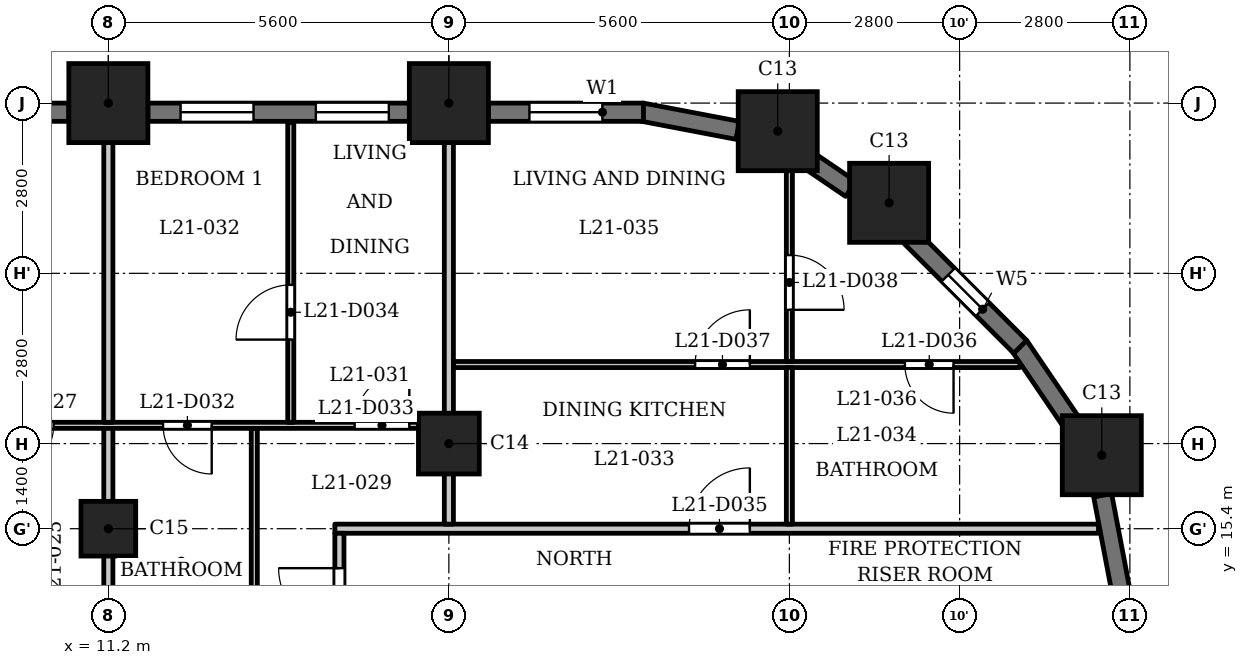
"""IFC4 building model, lengths in metres.
Left out: names, types, materials, properties, quantities, classifications, styles, units other than length and angle.
Written with IfcOpenShell. Run it as: python <this file> out.ifc"""

import sys

from ifc_helpers import new_model, si_unit, direction, frame, frame_2d, origin, origin_2d, place, context, subcontext, project, spatial, rectangle, extrude, element, fill, save


model = new_model("IFC4")
c1 = context("Model", 3, precision=1e-05, world=origin(), true_north=direction((0.0, 1.0)))
c2 = subcontext(c1, "Body", "Model", "MODEL_VIEW")
j1 = project(units=[si_unit("LENGTHUNIT", "METRE"), si_unit("PLANEANGLEUNIT", "RADIAN")], contexts=[c1])
p1 = place(None, origin())
s1 = spatial("IfcSite", under=j1, at=p1, CompositionType="ELEMENT")
p2 = place(p1, origin())
s2 = spatial("IfcBuilding", under=s1, at=p2, CompositionType="ELEMENT")
p3 = place(p2, frame((0.0, 0.0, 86.8)))
s3 = spatial("IfcBuildingStorey", under=s2, at=p3, CompositionType="ELEMENT", Elevation=86.8)
for number, where, z_axis, x_axis in (
    (1, (27.538, 16.609, 0.0), (0.0, 0.0, 1.0), (1.0, 0.0, 0.0)),
    (2, (24.04, 20.76, 0.0), (0.0, 0.0, 1.0), (1.0, 0.0, 0.0)),
    (3, (22.209, 21.938, 0.0), (0.0, 0.0, 1.0), (1.0, 0.0, 0.0)),
    (4, (16.8, 22.4, 0.0), (0.0, 0.0, 1.0), (1.0, 0.0, 0.0)),
    (5, (11.2, 22.4, 0.0), (0.0, 0.0, 1.0), (1.0, 0.0, 0.0)),
):
    element("IfcColumn", number, at=place(p3, frame(where, z_axis=z_axis, x_axis=x_axis)), inside=s3, PredefinedType="COLUMN", context=c2, shape_type="SweptSolid", body=[
        extrude(rectangle(XDim=1.3, YDim=1.3, at=origin_2d()), origin(), (0.0, 0.0, 1.0), 3.5),
    ])
p4 = place(p3, frame((16.8, 16.8, 0.0), z_axis=(0.0, 0.0, 1.0), x_axis=(1.0, 0.0, 0.0)))
e6 = element("IfcColumn", 6, at=p4, inside=s3, PredefinedType="COLUMN", context=c2, shape_type="SweptSolid", body=[
    extrude(rectangle(XDim=1.0, YDim=1.0, at=origin_2d()), origin(), (0.0, 0.0, 1.0), 3.5),
])
p5 = place(p3, frame((11.2, 15.4, 0.0), z_axis=(0.0, 0.0, 1.0), x_axis=(1.0, 0.0, 0.0)))
e7 = element("IfcColumn", 7, at=p5, inside=s3, PredefinedType="COLUMN", context=c2, shape_type="SweptSolid", body=[
    extrude(rectangle(XDim=0.9, YDim=0.9, at=origin_2d()), origin(), (0.0, 0.0, 1.0), 3.5),
])
for number, where, z_axis, x_axis in (
    (8, (27.853, 14.372, 0.0), (0.0, 0.0, 1.0), (-0.187, 0.982, 0.0)),
    (9, (27.082, 17.084, 0.0), (0.0, 0.0, 1.0), (-0.562, 0.827, 0.0)),
):
    element("IfcWall", number, at=place(p3, frame(where, z_axis=z_axis, x_axis=x_axis)), inside=s3, PredefinedType="SOLIDWALL", context=c2, shape_type="SweptSolid", body=[
        extrude(rectangle(XDim=1.606, YDim=0.3, at=frame_2d((0.803, 0.0))), origin(), (0.0, 0.0, 1.0), 2.4),
    ])
p6 = place(p3, frame((26.197, 18.391, 0.0), z_axis=(0.0, 0.0, 1.0), x_axis=(-0.707058908279, 0.707154650853, 0.0)))
e10 = element("IfcWall", 10, at=p6, inside=s3, PredefinedType="SOLIDWALL", context=c2, shape_type="SweptSolid", body=[
    extrude(rectangle(XDim=2.55, YDim=0.3, at=frame_2d((1.275, 0.0))), origin(), (0.0, 0.0, 1.0), 2.4),
])
p7 = place(p6, frame((0.875, 0.0, 0.6)))
e11 = element("IfcOpeningElement", 11, at=p7, cuts=e10, PredefinedType="OPENING", context=c2, shape_type="SweptSolid", body=[
    extrude(rectangle(XDim=0.8, YDim=1.55, at=frame_2d((0.4, 0.775))), frame((0.0, 0.16, 0.0), z_axis=(0.0, -1.0, 0.0), x_axis=(1.0, 0.0, 0.0)), (0.0, 0.0, 1.0), 0.32),
])
p8 = place(p3, frame((23.41, 20.989, 0.0), z_axis=(0.0, 0.0, 1.0), x_axis=(-0.827050703543, 0.562127328787, 0.0)))
e12 = element("IfcWall", 12, at=p8, inside=s3, PredefinedType="SOLIDWALL", context=c2, shape_type="SweptSolid", body=[
    extrude(rectangle(XDim=0.877, YDim=0.3, at=frame_2d((0.438, 0.0))), origin(), (0.0, 0.0, 1.0), 3.2),
])
p9 = place(p3, frame((21.55, 21.952, 0.0), z_axis=(0.0, 0.0, 1.0), x_axis=(-0.982278644094, 0.187426426519, 0.0)))
e13 = element("IfcWall", 13, at=p9, inside=s3, PredefinedType="SOLIDWALL", context=c2, shape_type="SweptSolid", body=[
    extrude(rectangle(XDim=1.606, YDim=0.3, at=frame_2d((0.803, 0.0))), origin(), (0.0, 0.0, 1.0), 2.4),
])
p10 = place(p3, frame((20.0, 22.25, 0.0), z_axis=(0.0, 0.0, 1.0), x_axis=(-1.0, 0.0, 0.0)))
e14 = element("IfcWall", 14, at=p10, inside=s3, PredefinedType="SOLIDWALL", context=c2, shape_type="SweptSolid", body=[
    extrude(rectangle(XDim=2.55, YDim=0.3, at=frame_2d((1.275, 0.0))), origin(), (0.0, 0.0, 1.0), 2.4),
])
p11 = place(p10, frame((0.675, 0.0, 0.6)))
e15 = element("IfcOpeningElement", 15, at=p11, cuts=e14, PredefinedType="OPENING", context=c2, shape_type="SweptSolid", body=[
    extrude(rectangle(XDim=1.2, YDim=1.55, at=frame_2d((0.6, 0.775))), frame((0.0, 0.16, 0.0), z_axis=(0.0, -1.0, 0.0), x_axis=(1.0, 0.0, 0.0)), (0.0, 0.0, 1.0), 0.32),
])
p12 = place(p3, frame((16.15, 22.25, 0.0), z_axis=(0.0, 0.0, 1.0), x_axis=(-1.0, 0.0, 0.0)))
e16 = element("IfcWall", 16, at=p12, inside=s3, PredefinedType="SOLIDWALL", context=c2, shape_type="SweptSolid", body=[
    extrude(rectangle(XDim=4.3, YDim=0.3, at=frame_2d((2.15, 0.0))), origin(), (0.0, 0.0, 1.0), 2.4),
])
p13 = place(p12, frame((0.337, 0.0, 0.6)))
e17 = element("IfcOpeningElement", 17, at=p13, cuts=e16, PredefinedType="OPENING", context=c2, shape_type="SweptSolid", body=[
    extrude(rectangle(XDim=1.2, YDim=1.55, at=frame_2d((0.6, 0.775))), frame((0.0, 0.16, 0.0), z_axis=(0.0, -1.0, 0.0), x_axis=(1.0, 0.0, 0.0)), (0.0, 0.0, 1.0), 0.32),
])
p14 = place(p12, frame((2.562, 0.0, 0.6)))
e18 = element("IfcOpeningElement", 18, at=p14, cuts=e16, PredefinedType="OPENING", context=c2, shape_type="SweptSolid", body=[
    extrude(rectangle(XDim=1.2, YDim=1.55, at=frame_2d((0.6, 0.775))), frame((0.0, 0.16, 0.0), z_axis=(0.0, -1.0, 0.0), x_axis=(1.0, 0.0, 0.0)), (0.0, 0.0, 1.0), 0.32),
])
p15 = place(p3, frame((10.55, 22.25, 0.0), z_axis=(0.0, 0.0, 1.0), x_axis=(-1.0, 0.0, 0.0)))
e19 = element("IfcWall", 19, at=p15, inside=s3, PredefinedType="SOLIDWALL", context=c2, shape_type="SweptSolid", body=[
    extrude(rectangle(XDim=4.3, YDim=0.3, at=frame_2d((2.15, 0.0))), origin(), (0.0, 0.0, 1.0), 2.4),
])
p16 = place(p15, frame((0.35, 0.0, 1.2)))
e20 = element("IfcOpeningElement", 20, at=p16, cuts=e19, PredefinedType="OPENING", context=c2, shape_type="SweptSolid", body=[
    extrude(rectangle(XDim=3.6, YDim=0.95, at=frame_2d((1.8, 0.475))), frame((0.0, 0.16, 0.0), z_axis=(0.0, -1.0, 0.0), x_axis=(1.0, 0.0, 0.0)), (0.0, 0.0, 1.0), 0.32),
])
p17 = place(p3, frame((14.925, 15.4, 0.0), z_axis=(0.0, 0.0, 1.0), x_axis=(1.0, 0.0, 0.0)))
e21 = element("IfcWall", 21, at=p17, inside=s3, PredefinedType="PARTITIONING", context=c2, shape_type="SweptSolid", body=[
    extrude(rectangle(XDim=12.559, YDim=0.15, at=frame_2d((6.279, 0.0))), origin(), (0.0, 0.0, 1.0), 3.2),
])
p18 = place(p17, frame((5.825, 0.0, 0.0)))
e22 = element("IfcOpeningElement", 22, at=p18, cuts=e21, PredefinedType="OPENING", context=c2, shape_type="SweptSolid", body=[
    extrude(rectangle(XDim=1.0, YDim=2.1, at=frame_2d((0.5, 1.05))), frame((0.0, 0.085, 0.0), z_axis=(0.0, -1.0, 0.0), x_axis=(1.0, 0.0, 0.0)), (0.0, 0.0, 1.0), 0.17),
])
p19 = place(p3, frame((-16.725, 17.1, 0.0), z_axis=(0.0, 0.0, 1.0), x_axis=(1.0, 0.0, 0.0)))
e23 = element("IfcWall", 23, at=p19, inside=s3, PredefinedType="PARTITIONING", context=c2, shape_type="SweptSolid", body=[
    extrude(rectangle(XDim=33.45, YDim=0.1, at=frame_2d((16.725, 0.0))), origin(), (0.0, 0.0, 1.0), 3.2),
])
p20 = place(p19, frame((3.925, 0.0, 0.0)))
e24 = element("IfcOpeningElement", 24, at=p20, cuts=e23, PredefinedType="OPENING", context=c2, shape_type="SweptSolid", body=[
    extrude(rectangle(XDim=0.8, YDim=2.1, at=frame_2d((0.4, 1.05))), frame((0.0, 0.06, 0.0), z_axis=(0.0, -1.0, 0.0), x_axis=(1.0, 0.0, 0.0)), (0.0, 0.0, 1.0), 0.12),
])
p21 = place(p19, frame((0.975, 0.0, 0.0)))
e25 = element("IfcOpeningElement", 25, at=p21, cuts=e23, PredefinedType="OPENING", context=c2, shape_type="SweptSolid", body=[
    extrude(rectangle(XDim=0.9, YDim=2.1, at=frame_2d((0.45, 1.05))), frame((0.0, 0.06, 0.0), z_axis=(0.0, -1.0, 0.0), x_axis=(1.0, 0.0, 0.0)), (0.0, 0.0, 1.0), 0.12),
])
p22 = place(p19, frame((6.425, 0.0, 0.0)))
e26 = element("IfcOpeningElement", 26, at=p22, cuts=e23, PredefinedType="OPENING", context=c2, shape_type="SweptSolid", body=[
    extrude(rectangle(XDim=0.8, YDim=2.1, at=frame_2d((0.4, 1.05))), frame((0.0, 0.06, 0.0), z_axis=(0.0, -1.0, 0.0), x_axis=(1.0, 0.0, 0.0)), (0.0, 0.0, 1.0), 0.12),
])
p23 = place(p19, frame((8.825, 0.0, 0.0)))
e27 = element("IfcOpeningElement", 27, at=p23, cuts=e23, PredefinedType="OPENING", context=c2, shape_type="SweptSolid", body=[
    extrude(rectangle(XDim=0.9, YDim=2.1, at=frame_2d((0.45, 1.05))), frame((0.0, 0.06, 0.0), z_axis=(0.0, -1.0, 0.0), x_axis=(1.0, 0.0, 0.0)), (0.0, 0.0, 1.0), 0.12),
])
p24 = place(p19, frame((12.375, 0.0, 0.0)))
e28 = element("IfcOpeningElement", 28, at=p24, cuts=e23, PredefinedType="OPENING", context=c2, shape_type="SweptSolid", body=[
    extrude(rectangle(XDim=0.9, YDim=2.1, at=frame_2d((0.45, 1.05))), frame((0.0, 0.06, 0.0), z_axis=(0.0, -1.0, 0.0), x_axis=(1.0, 0.0, 0.0)), (0.0, 0.0, 1.0), 0.12),
])
p25 = place(p19, frame((14.425, 0.0, 0.0)))
e29 = element("IfcOpeningElement", 29, at=p25, cuts=e23, PredefinedType="OPENING", context=c2, shape_type="SweptSolid", body=[
    extrude(rectangle(XDim=0.9, YDim=2.1, at=frame_2d((0.45, 1.05))), frame((0.0, 0.06, 0.0), z_axis=(0.0, -1.0, 0.0), x_axis=(1.0, 0.0, 0.0)), (0.0, 0.0, 1.0), 0.12),
])
p26 = place(p19, frame((26.225, 0.0, 0.0)))
e30 = element("IfcOpeningElement", 30, at=p26, cuts=e23, PredefinedType="OPENING", context=c2, shape_type="SweptSolid", body=[
    extrude(rectangle(XDim=0.8, YDim=2.1, at=frame_2d((0.4, 1.05))), frame((0.0, 0.06, 0.0), z_axis=(0.0, -1.0, 0.0), x_axis=(1.0, 0.0, 0.0)), (0.0, 0.0, 1.0), 0.12),
])
p27 = place(p19, frame((23.025, 0.0, 0.0)))
e31 = element("IfcOpeningElement", 31, at=p27, cuts=e23, PredefinedType="OPENING", context=c2, shape_type="SweptSolid", body=[
    extrude(rectangle(XDim=0.9, YDim=2.1, at=frame_2d((0.45, 1.05))), frame((0.0, 0.06, 0.0), z_axis=(0.0, -1.0, 0.0), x_axis=(1.0, 0.0, 0.0)), (0.0, 0.0, 1.0), 0.12),
])
p28 = place(p19, frame((17.775, 0.0, 0.0)))
e32 = element("IfcOpeningElement", 32, at=p28, cuts=e23, PredefinedType="OPENING", context=c2, shape_type="SweptSolid", body=[
    extrude(rectangle(XDim=0.9, YDim=2.1, at=frame_2d((0.45, 1.05))), frame((0.0, 0.06, 0.0), z_axis=(0.0, -1.0, 0.0), x_axis=(1.0, 0.0, 0.0)), (0.0, 0.0, 1.0), 0.12),
])
p29 = place(p19, frame((20.025, 0.0, 0.0)))
e33 = element("IfcOpeningElement", 33, at=p29, cuts=e23, PredefinedType="OPENING", context=c2, shape_type="SweptSolid", body=[
    extrude(rectangle(XDim=0.9, YDim=2.1, at=frame_2d((0.45, 1.05))), frame((0.0, 0.06, 0.0), z_axis=(0.0, -1.0, 0.0), x_axis=(1.0, 0.0, 0.0)), (0.0, 0.0, 1.0), 0.12),
])
p30 = place(p19, frame((28.825, 0.0, 0.0)))
e34 = element("IfcOpeningElement", 34, at=p30, cuts=e23, PredefinedType="OPENING", context=c2, shape_type="SweptSolid", body=[
    extrude(rectangle(XDim=0.8, YDim=2.1, at=frame_2d((0.4, 1.05))), frame((0.0, 0.06, 0.0), z_axis=(0.0, -1.0, 0.0), x_axis=(1.0, 0.0, 0.0)), (0.0, 0.0, 1.0), 0.12),
])
p31 = place(p19, frame((31.975, 0.0, 0.0)))
e35 = element("IfcOpeningElement", 35, at=p31, cuts=e23, PredefinedType="OPENING", context=c2, shape_type="SweptSolid", body=[
    extrude(rectangle(XDim=0.9, YDim=2.1, at=frame_2d((0.45, 1.05))), frame((0.0, 0.06, 0.0), z_axis=(0.0, -1.0, 0.0), x_axis=(1.0, 0.0, 0.0)), (0.0, 0.0, 1.0), 0.12),
])
p32 = place(p3, frame((16.875, 18.1, 0.0), z_axis=(0.0, 0.0, 1.0), x_axis=(1.0, 0.0, 0.0)))
e36 = element("IfcWall", 36, at=p32, inside=s3, PredefinedType="PARTITIONING", context=c2, shape_type="SweptSolid", body=[
    extrude(rectangle(XDim=9.315, YDim=0.1, at=frame_2d((4.658, 0.0))), origin(), (0.0, 0.0, 1.0), 3.2),
])
p33 = place(p32, frame((7.425, 0.0, 0.0)))
e37 = element("IfcOpeningElement", 37, at=p33, cuts=e36, PredefinedType="OPENING", context=c2, shape_type="SweptSolid", body=[
    extrude(rectangle(XDim=0.8, YDim=2.1, at=frame_2d((0.4, 1.05))), frame((0.0, 0.06, 0.0), z_axis=(0.0, -1.0, 0.0), x_axis=(1.0, 0.0, 0.0)), (0.0, 0.0, 1.0), 0.12),
])
p34 = place(p32, frame((3.975, 0.0, 0.0)))
e38 = element("IfcOpeningElement", 38, at=p34, cuts=e36, PredefinedType="OPENING", context=c2, shape_type="SweptSolid", body=[
    extrude(rectangle(XDim=0.9, YDim=2.1, at=frame_2d((0.45, 1.05))), frame((0.0, 0.06, 0.0), z_axis=(0.0, -1.0, 0.0), x_axis=(1.0, 0.0, 0.0)), (0.0, 0.0, 1.0), 0.12),
])
p35 = place(p3, frame((11.2, 13.275, 0.0), z_axis=(0.0, 0.0, 1.0), x_axis=(0.0, 1.0, 0.0)))
e39 = element("IfcWall", 39, at=p35, inside=s3, PredefinedType="PARTITIONING", context=c2, shape_type="SweptSolid", body=[
    extrude(rectangle(XDim=3.775, YDim=0.15, at=frame_2d((1.888, 0.0))), origin(), (0.0, 0.0, 1.0), 3.2),
])
p36 = place(p3, frame((11.2, 17.15, 0.0), z_axis=(0.0, 0.0, 1.0), x_axis=(0.0, 1.0, 0.0)))
e40 = element("IfcWall", 40, at=p36, inside=s3, PredefinedType="PARTITIONING", context=c2, shape_type="SweptSolid", body=[
    extrude(rectangle(XDim=5.88, YDim=0.15, at=frame_2d((2.94, 0.0))), origin(), (0.0, 0.0, 1.0), 3.2),
])
p37 = place(p3, frame((13.6, 13.275, 0.0), z_axis=(0.0, 0.0, 1.0), x_axis=(0.0, 1.0, 0.0)))
e41 = element("IfcWall", 41, at=p37, inside=s3, PredefinedType="PARTITIONING", context=c2, shape_type="SweptSolid", body=[
    extrude(rectangle(XDim=3.775, YDim=0.1, at=frame_2d((1.888, 0.0))), origin(), (0.0, 0.0, 1.0), 3.2),
])
p38 = place(p3, frame((14.2, 17.15, 0.0), z_axis=(0.0, 0.0, 1.0), x_axis=(0.0, 1.0, 0.0)))
e42 = element("IfcWall", 42, at=p38, inside=s3, PredefinedType="PARTITIONING", context=c2, shape_type="SweptSolid", body=[
    extrude(rectangle(XDim=4.93, YDim=0.1, at=frame_2d((2.465, 0.0))), origin(), (0.0, 0.0, 1.0), 3.2),
])
p39 = place(p38, frame((1.36, 0.0, 0.0)))
e43 = element("IfcOpeningElement", 43, at=p39, cuts=e42, PredefinedType="OPENING", context=c2, shape_type="SweptSolid", body=[
    extrude(rectangle(XDim=0.9, YDim=2.1, at=frame_2d((0.45, 1.05))), frame((0.0, 0.06, 0.0), z_axis=(0.0, -1.0, 0.0), x_axis=(1.0, 0.0, 0.0)), (0.0, 0.0, 1.0), 0.12),
])
p40 = place(p3, frame((15.0, 13.275, 0.0), z_axis=(0.0, 0.0, 1.0), x_axis=(0.0, 1.0, 0.0)))
e44 = element("IfcWall", 44, at=p40, inside=s3, PredefinedType="PARTITIONING", context=c2, shape_type="SweptSolid", body=[
    extrude(rectangle(XDim=2.05, YDim=0.15, at=frame_2d((1.025, 0.0))), origin(), (0.0, 0.0, 1.0), 3.2),
])
p41 = place(p40, frame((0.476, 0.0, 0.0)))
e45 = element("IfcOpeningElement", 45, at=p41, cuts=e44, PredefinedType="OPENING", context=c2, shape_type="SweptSolid", body=[
    extrude(rectangle(XDim=1.0, YDim=2.1, at=frame_2d((0.5, 1.05))), frame((0.0, 0.085, 0.0), z_axis=(0.0, -1.0, 0.0), x_axis=(1.0, 0.0, 0.0)), (0.0, 0.0, 1.0), 0.17),
])
p42 = place(p3, frame((16.8, 15.475, 0.0), z_axis=(0.0, 0.0, 1.0), x_axis=(0.0, 1.0, 0.0)))
e46 = element("IfcWall", 46, at=p42, inside=s3, PredefinedType="PARTITIONING", context=c2, shape_type="SweptSolid", body=[
    extrude(rectangle(XDim=7.555, YDim=0.15, at=frame_2d((3.777, 0.0))), origin(), (0.0, 0.0, 1.0), 3.2),
])
p43 = place(p3, frame((22.4, 15.475, 0.0), z_axis=(0.0, 0.0, 1.0), x_axis=(0.0, 1.0, 0.0)))
e47 = element("IfcWall", 47, at=p43, inside=s3, PredefinedType="PARTITIONING", context=c2, shape_type="SweptSolid", body=[
    extrude(rectangle(XDim=2.575, YDim=0.1, at=frame_2d((1.288, 0.0))), origin(), (0.0, 0.0, 1.0), 3.2),
])
p44 = place(p3, frame((22.4, 18.15, 0.0), z_axis=(0.0, 0.0, 1.0), x_axis=(0.0, 1.0, 0.0)))
e48 = element("IfcWall", 48, at=p44, inside=s3, PredefinedType="PARTITIONING", context=c2, shape_type="SweptSolid", body=[
    extrude(rectangle(XDim=3.57, YDim=0.1, at=frame_2d((1.785, 0.0))), origin(), (0.0, 0.0, 1.0), 3.2),
])
p45 = place(p44, frame((0.85, 0.0, 0.0)))
e49 = element("IfcOpeningElement", 49, at=p45, cuts=e48, PredefinedType="OPENING", context=c2, shape_type="SweptSolid", body=[
    extrude(rectangle(XDim=0.9, YDim=2.1, at=frame_2d((0.45, 1.05))), frame((0.0, 0.06, 0.0), z_axis=(0.0, -1.0, 0.0), x_axis=(1.0, 0.0, 0.0)), (0.0, 0.0, 1.0), 0.12),
])
p46 = place(p26, origin())
e50 = element("IfcDoor", 50, at=p46, inside=s3, OperationType="SINGLE_SWING_LEFT", PredefinedType="DOOR", context=c2, shape_type="SweptSolid", body=[
    extrude(rectangle(XDim=0.8, YDim=2.1, at=frame_2d((0.4, 1.05))), frame((0.0, 0.025, 0.0), z_axis=(0.0, -1.0, 0.0), x_axis=(1.0, 0.0, 0.0)), (0.0, 0.0, 1.0), 0.05),
])
fill(e30, e50)
p47 = place(p41, origin())
e51 = element("IfcDoor", 51, at=p47, inside=s3, OperationType="SINGLE_SWING_LEFT", PredefinedType="DOOR", context=c2, shape_type="SweptSolid", body=[
    extrude(rectangle(XDim=1.0, YDim=2.1, at=frame_2d((0.5, 1.05))), frame((0.0, 0.025, 0.0), z_axis=(0.0, -1.0, 0.0), x_axis=(1.0, 0.0, 0.0)), (0.0, 0.0, 1.0), 0.05),
])
fill(e45, e51)
p48 = place(p30, origin())
e52 = element("IfcDoor", 52, at=p48, inside=s3, OperationType="SINGLE_SWING_RIGHT", PredefinedType="DOOR", context=c2, shape_type="SweptSolid", body=[
    extrude(rectangle(XDim=0.8, YDim=2.1, at=frame_2d((0.4, 1.05))), frame((0.0, 0.025, 0.0), z_axis=(0.0, -1.0, 0.0), x_axis=(1.0, 0.0, 0.0)), (0.0, 0.0, 1.0), 0.05),
])
fill(e34, e52)
p49 = place(p31, origin())
e53 = element("IfcDoor", 53, at=p49, inside=s3, OperationType="SINGLE_SWING_LEFT", PredefinedType="DOOR", context=c2, shape_type="SweptSolid", body=[
    extrude(rectangle(XDim=0.9, YDim=2.1, at=frame_2d((0.45, 1.05))), frame((0.0, 0.025, 0.0), z_axis=(0.0, -1.0, 0.0), x_axis=(1.0, 0.0, 0.0)), (0.0, 0.0, 1.0), 0.05),
])
fill(e35, e53)
p50 = place(p39, origin())
e54 = element("IfcDoor", 54, at=p50, inside=s3, OperationType="SINGLE_SWING_RIGHT", PredefinedType="DOOR", context=c2, shape_type="SweptSolid", body=[
    extrude(rectangle(XDim=0.9, YDim=2.1, at=frame_2d((0.45, 1.05))), frame((0.0, 0.025, 0.0), z_axis=(0.0, -1.0, 0.0), x_axis=(1.0, 0.0, 0.0)), (0.0, 0.0, 1.0), 0.05),
])
fill(e43, e54)
p51 = place(p18, origin())
e55 = element("IfcDoor", 55, at=p51, inside=s3, OperationType="SINGLE_SWING_LEFT", PredefinedType="DOOR", context=c2, shape_type="SweptSolid", body=[
    extrude(rectangle(XDim=1.0, YDim=2.1, at=frame_2d((0.5, 1.05))), frame((0.0, 0.025, 0.0), z_axis=(0.0, -1.0, 0.0), x_axis=(1.0, 0.0, 0.0)), (0.0, 0.0, 1.0), 0.05),
])
fill(e22, e55)
p52 = place(p33, origin())
e56 = element("IfcDoor", 56, at=p52, inside=s3, OperationType="SINGLE_SWING_RIGHT", PredefinedType="DOOR", context=c2, shape_type="SweptSolid", body=[
    extrude(rectangle(XDim=0.8, YDim=2.1, at=frame_2d((0.4, 1.05))), frame((0.0, 0.025, 0.0), z_axis=(0.0, -1.0, 0.0), x_axis=(1.0, 0.0, 0.0)), (0.0, 0.0, 1.0), 0.05),
])
fill(e37, e56)
p53 = place(p34, origin())
e57 = element("IfcDoor", 57, at=p53, inside=s3, OperationType="SINGLE_SWING_LEFT", PredefinedType="DOOR", context=c2, shape_type="SweptSolid", body=[
    extrude(rectangle(XDim=0.9, YDim=2.1, at=frame_2d((0.45, 1.05))), frame((0.0, 0.025, 0.0), z_axis=(0.0, -1.0, 0.0), x_axis=(1.0, 0.0, 0.0)), (0.0, 0.0, 1.0), 0.05),
])
fill(e38, e57)
p54 = place(p45, origin())
e58 = element("IfcDoor", 58, at=p54, inside=s3, OperationType="SINGLE_SWING_LEFT", PredefinedType="DOOR", context=c2, shape_type="SweptSolid", body=[
    extrude(rectangle(XDim=0.9, YDim=2.1, at=frame_2d((0.45, 1.05))), frame((0.0, 0.025, 0.0), z_axis=(0.0, -1.0, 0.0), x_axis=(1.0, 0.0, 0.0)), (0.0, 0.0, 1.0), 0.05),
])
fill(e49, e58)
p55 = place(p7, origin())
e59 = element("IfcWindow", 59, at=p55, inside=s3, PartitioningType="SINGLE_PANEL", PredefinedType="WINDOW", context=c2, shape_type="SweptSolid", body=[
    extrude(rectangle(XDim=0.8, YDim=1.55, at=frame_2d((0.4, 0.775))), frame((0.0, 0.03, 0.0), z_axis=(0.0, -1.0, 0.0), x_axis=(1.0, 0.0, 0.0)), (0.0, 0.0, 1.0), 0.06),
])
fill(e11, e59)
p56 = place(p11, origin())
e60 = element("IfcWindow", 60, at=p56, inside=s3, PartitioningType="SINGLE_PANEL", PredefinedType="WINDOW", context=c2, shape_type="SweptSolid", body=[
    extrude(rectangle(XDim=1.2, YDim=1.55, at=frame_2d((0.6, 0.775))), frame((0.0, 0.03, 0.0), z_axis=(0.0, -1.0, 0.0), x_axis=(1.0, 0.0, 0.0)), (0.0, 0.0, 1.0), 0.06),
])
fill(e15, e60)
p57 = place(p13, origin())
e61 = element("IfcWindow", 61, at=p57, inside=s3, PartitioningType="SINGLE_PANEL", PredefinedType="WINDOW", context=c2, shape_type="SweptSolid", body=[
    extrude(rectangle(XDim=1.2, YDim=1.55, at=frame_2d((0.6, 0.775))), frame((0.0, 0.03, 0.0), z_axis=(0.0, -1.0, 0.0), x_axis=(1.0, 0.0, 0.0)), (0.0, 0.0, 1.0), 0.06),
])
fill(e17, e61)
p58 = place(p14, origin())
e62 = element("IfcWindow", 62, at=p58, inside=s3, PartitioningType="SINGLE_PANEL", PredefinedType="WINDOW", context=c2, shape_type="SweptSolid", body=[
    extrude(rectangle(XDim=1.2, YDim=1.55, at=frame_2d((0.6, 0.775))), frame((0.0, 0.03, 0.0), z_axis=(0.0, -1.0, 0.0), x_axis=(1.0, 0.0, 0.0)), (0.0, 0.0, 1.0), 0.06),
])
fill(e18, e62)
save(model, sys.argv[1])
